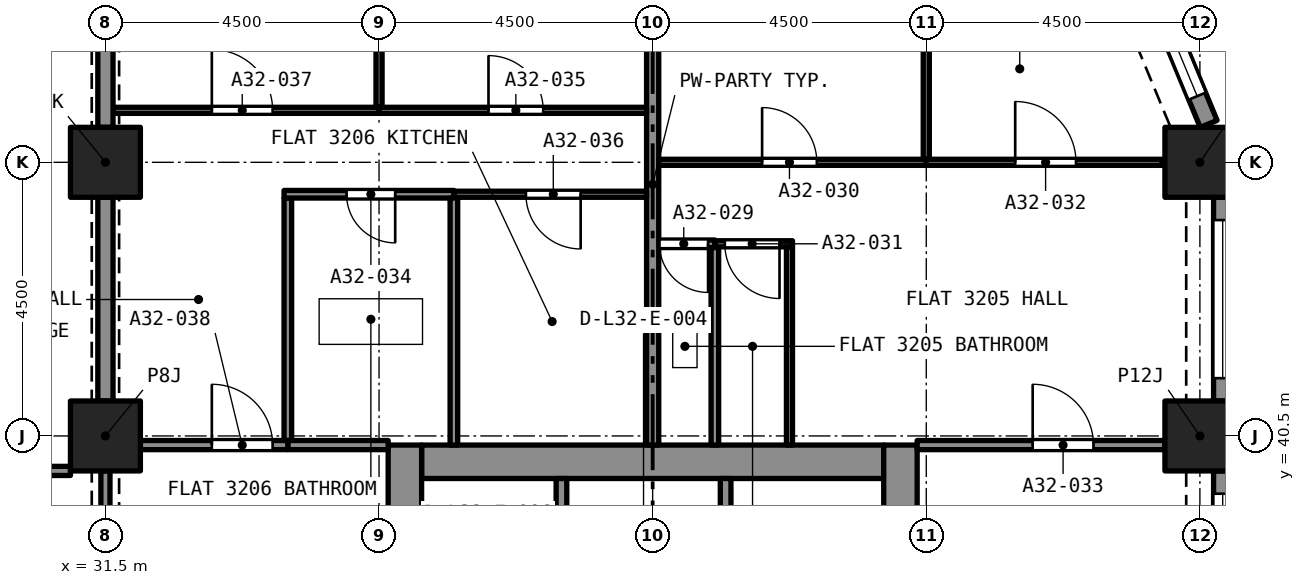
"""IFC4 building model, lengths in metres.
Left out: names, types, materials, properties, quantities, classifications, styles, units other than length and angle.
Written with IfcOpenShell. Run it as: python <this file> out.ifc"""

import sys

from ifc_helpers import new_model, si_unit, direction, frame, frame_2d, origin, origin_2d, place, context, subcontext, project, spatial, rectangle, extrude, element, fill, save


model = new_model("IFC4")
c1 = context("Model", 3, precision=1e-05, world=origin(), true_north=direction((0.0, 1.0)))
c2 = subcontext(c1, "Body", "Model", "MODEL_VIEW")
j1 = project(units=[si_unit("LENGTHUNIT", "METRE"), si_unit("PLANEANGLEUNIT", "RADIAN")], contexts=[c1])
p1 = place(None, origin())
s1 = spatial("IfcSite", under=j1, at=p1, CompositionType="ELEMENT")
p2 = place(p1, origin())
s2 = spatial("IfcBuilding", under=s1, at=p2, CompositionType="ELEMENT")
p3 = place(p2, frame((0.0, 0.0, 115.2)))
s3 = spatial("IfcBuildingStorey", under=s2, at=p3, CompositionType="ELEMENT", Elevation=115.2)
for number, where, z_axis, x_axis in (
    (1, (31.5, 40.5, 0.0), (0.0, 0.0, 1.0), (1.0, 0.0, 0.0)),
    (2, (49.5, 40.5, 0.0), (0.0, 0.0, 1.0), (1.0, 0.0, 0.0)),
    (3, (31.5, 45.0, 0.0), (0.0, 0.0, 1.0), (1.0, 0.0, 0.0)),
    (4, (49.5, 45.0, 0.0), (0.0, 0.0, 1.0), (1.0, 0.0, 0.0)),
):
    element("IfcColumn", number, at=place(p3, frame(where, z_axis=z_axis, x_axis=x_axis)), inside=s3, PredefinedType="COLUMN", context=c2, shape_type="SweptSolid", body=[
        extrude(rectangle(XDim=1.15, YDim=1.15, at=origin_2d()), origin(), (0.0, 0.0, 1.0), 3.2),
    ])
p4 = place(p3, frame((36.7, 40.075, 0.0), z_axis=(0.0, 0.0, 1.0), x_axis=(1.0, 0.0, 0.0)))
e5 = element("IfcWall", 5, at=p4, inside=s3, PredefinedType="SOLIDWALL", context=c2, shape_type="SweptSolid", body=[
    extrude(rectangle(XDim=7.6, YDim=0.55, at=frame_2d((3.8, 0.0))), origin(), (0.0, 0.0, 1.0), 3.2),
])
p5 = place(p3, frame((36.425, 27.15, 0.0), z_axis=(0.0, 0.0, 1.0), x_axis=(0.0, 1.0, 0.0)))
e6 = element("IfcWall", 6, at=p5, inside=s3, PredefinedType="SOLIDWALL", context=c2, shape_type="SweptSolid", body=[
    extrude(rectangle(XDim=13.2, YDim=0.55, at=frame_2d((6.6, 0.0))), origin(), (0.0, 0.0, 1.0), 3.2),
])
p6 = place(p5, frame((8.8, 0.0, 0.0)))
e7 = element("IfcOpeningElement", 7, at=p6, cuts=e6, PredefinedType="OPENING", context=c2, shape_type="SweptSolid", body=[
    extrude(rectangle(XDim=1.2, YDim=2.1, at=frame_2d((0.6, 1.05))), frame((0.0, 0.285, 0.0), z_axis=(0.0, -1.0, 0.0), x_axis=(1.0, 0.0, 0.0)), (0.0, 0.0, 1.0), 0.57),
])
p7 = place(p3, frame((44.575, 27.15, 0.0), z_axis=(0.0, 0.0, 1.0), x_axis=(0.0, 1.0, 0.0)))
e8 = element("IfcWall", 8, at=p7, inside=s3, PredefinedType="SOLIDWALL", context=c2, shape_type="SweptSolid", body=[
    extrude(rectangle(XDim=13.2, YDim=0.55, at=frame_2d((6.6, 0.0))), origin(), (0.0, 0.0, 1.0), 3.2),
])
p8 = place(p7, frame((8.8, 0.0, 0.0)))
e9 = element("IfcOpeningElement", 9, at=p8, cuts=e8, PredefinedType="OPENING", context=c2, shape_type="SweptSolid", body=[
    extrude(rectangle(XDim=1.2, YDim=2.1, at=frame_2d((0.6, 1.05))), frame((0.0, 0.285, 0.0), z_axis=(0.0, -1.0, 0.0), x_axis=(1.0, 0.0, 0.0)), (0.0, 0.0, 1.0), 0.57),
])
p9 = place(p3, frame((49.875, 39.925, 0.0), z_axis=(0.0, 0.0, 1.0), x_axis=(0.0, -1.0, 0.0)))
e10 = element("IfcWall", 10, at=p9, inside=s3, PredefinedType="SOLIDWALL", context=c2, shape_type="SweptSolid", body=[
    extrude(rectangle(XDim=3.35, YDim=0.3, at=frame_2d((1.675, 0.0))), origin(), (0.0, 0.0, 1.0), 3.2),
])
p10 = place(p9, frame((0.375, 0.0, 0.45)))
e11 = element("IfcOpeningElement", 11, at=p10, cuts=e10, PredefinedType="OPENING", context=c2, shape_type="SweptSolid", body=[
    extrude(rectangle(XDim=2.6, YDim=1.95, at=frame_2d((1.3, 0.975))), frame((0.0, 0.16, 0.0), z_axis=(0.0, -1.0, 0.0), x_axis=(1.0, 0.0, 0.0)), (0.0, 0.0, 1.0), 0.32),
])
p11 = place(p3, frame((49.875, 44.425, 0.0), z_axis=(0.0, 0.0, 1.0), x_axis=(0.0, -1.0, 0.0)))
e12 = element("IfcWall", 12, at=p11, inside=s3, PredefinedType="SOLIDWALL", context=c2, shape_type="SweptSolid", body=[
    extrude(rectangle(XDim=3.35, YDim=0.3, at=frame_2d((1.675, 0.0))), origin(), (0.0, 0.0, 1.0), 3.2),
])
p12 = place(p11, frame((0.375, 0.0, 0.45)))
e13 = element("IfcOpeningElement", 13, at=p12, cuts=e12, PredefinedType="OPENING", context=c2, shape_type="SweptSolid", body=[
    extrude(rectangle(XDim=2.6, YDim=1.95, at=frame_2d((1.3, 0.975))), frame((0.0, 0.16, 0.0), z_axis=(0.0, -1.0, 0.0), x_axis=(1.0, 0.0, 0.0)), (0.0, 0.0, 1.0), 0.32),
])
p13 = place(p3, frame((48.816, 47.631, 0.0), z_axis=(0.0, 0.0, 1.0), x_axis=(0.382723818695, -0.923862802911, 0.0)))
e14 = element("IfcWall", 14, at=p13, inside=s3, PredefinedType="SOLIDWALL", context=c2, shape_type="SweptSolid", body=[
    extrude(rectangle(XDim=2.164, YDim=0.3, at=frame_2d((1.082, 0.0))), origin(), (0.0, 0.0, 1.0), 3.2),
])
p14 = place(p13, frame((0.271, 0.0, 0.45)))
e15 = element("IfcOpeningElement", 15, at=p14, cuts=e14, PredefinedType="OPENING", context=c2, shape_type="SweptSolid", body=[
    extrude(rectangle(XDim=1.4, YDim=1.95, at=frame_2d((0.7, 0.975))), frame((0.0, 0.16, 0.0), z_axis=(0.0, -1.0, 0.0), x_axis=(1.0, 0.0, 0.0)), (0.0, 0.0, 1.0), 0.32),
])
p15 = place(p3, frame((41.523, 43.66, 0.0), z_axis=(0.0, 0.0, 1.0), x_axis=(-1.0, 0.0, 0.0)))
e16 = element("IfcWall", 16, at=p15, inside=s3, PredefinedType="PARTITIONING", context=c2, shape_type="SweptSolid", body=[
    extrude(rectangle(XDim=0.923, YDim=0.125, at=frame_2d((0.461, 0.0))), origin(), (0.0, 0.0, 1.0), 2.9),
])
p16 = place(p15, frame((0.111, 0.0, 0.0)))
e17 = element("IfcOpeningElement", 17, at=p16, cuts=e16, PredefinedType="OPENING", context=c2, shape_type="SweptSolid", body=[
    extrude(rectangle(XDim=0.8, YDim=2.1, at=frame_2d((0.4, 1.05))), frame((0.0, 0.073, 0.0), z_axis=(0.0, -1.0, 0.0), x_axis=(1.0, 0.0, 0.0)), (0.0, 0.0, 1.0), 0.145),
])
p17 = place(p3, frame((41.523, 40.35, 0.0), z_axis=(0.0, 0.0, 1.0), x_axis=(0.0, 1.0, 0.0)))
e18 = element("IfcWall", 18, at=p17, inside=s3, PredefinedType="PARTITIONING", context=c2, shape_type="SweptSolid", body=[
    extrude(rectangle(XDim=3.247, YDim=0.125, at=frame_2d((1.624, 0.0))), origin(), (0.0, 0.0, 1.0), 2.9),
])
p18 = place(p3, frame((40.5, 40.35, 0.0), z_axis=(0.0, 0.0, 1.0), x_axis=(0.0, 1.0, 0.0)))
e19 = element("IfcWall", 19, at=p18, inside=s3, PredefinedType="PARTITIONING", context=c2, shape_type="SweptSolid", body=[
    extrude(rectangle(XDim=8.575, YDim=0.2, at=frame_2d((4.288, 0.0))), origin(), (0.0, 0.0, 1.0), 2.9),
])
p19 = place(p3, frame((40.6, 45.0, 0.0), z_axis=(0.0, 0.0, 1.0), x_axis=(1.0, 0.0, 0.0)))
e20 = element("IfcWall", 20, at=p19, inside=s3, PredefinedType="PARTITIONING", context=c2, shape_type="SweptSolid", body=[
    extrude(rectangle(XDim=4.4, YDim=0.1, at=frame_2d((2.2, 0.0))), origin(), (0.0, 0.0, 1.0), 2.9),
])
p20 = place(p19, frame((1.7, 0.0, 0.0)))
e21 = element("IfcOpeningElement", 21, at=p20, cuts=e20, PredefinedType="OPENING", context=c2, shape_type="SweptSolid", body=[
    extrude(rectangle(XDim=0.9, YDim=2.1, at=frame_2d((0.45, 1.05))), frame((0.0, 0.06, 0.0), z_axis=(0.0, -1.0, 0.0), x_axis=(1.0, 0.0, 0.0)), (0.0, 0.0, 1.0), 0.12),
])
p21 = place(p3, frame((45.0, 45.05, 0.0), z_axis=(0.0, 0.0, 1.0), x_axis=(0.0, 1.0, 0.0)))
e22 = element("IfcWall", 22, at=p21, inside=s3, PredefinedType="PARTITIONING", context=c2, shape_type="SweptSolid", body=[
    extrude(rectangle(XDim=3.828, YDim=0.1, at=frame_2d((1.914, 0.0))), origin(), (0.0, 0.0, 1.0), 2.9),
])
p22 = place(p3, frame((42.75, 40.35, 0.0), z_axis=(0.0, 0.0, 1.0), x_axis=(0.0, 1.0, 0.0)))
e23 = element("IfcWall", 23, at=p22, inside=s3, PredefinedType="PARTITIONING", context=c2, shape_type="SweptSolid", body=[
    extrude(rectangle(XDim=3.26, YDim=0.1, at=frame_2d((1.63, 0.0))), origin(), (0.0, 0.0, 1.0), 2.9),
])
p23 = place(p3, frame((42.8, 43.66, 0.0), z_axis=(0.0, 0.0, 1.0), x_axis=(-1.0, 0.0, 0.0)))
e24 = element("IfcWall", 24, at=p23, inside=s3, PredefinedType="PARTITIONING", context=c2, shape_type="SweptSolid", body=[
    extrude(rectangle(XDim=1.277, YDim=0.1, at=frame_2d((0.639, 0.0))), origin(), (0.0, 0.0, 1.0), 2.9),
])
p24 = place(p23, frame((0.214, 0.0, 0.0)))
e25 = element("IfcOpeningElement", 25, at=p24, cuts=e24, PredefinedType="OPENING", context=c2, shape_type="SweptSolid", body=[
    extrude(rectangle(XDim=0.9, YDim=2.1, at=frame_2d((0.45, 1.05))), frame((0.0, 0.06, 0.0), z_axis=(0.0, -1.0, 0.0), x_axis=(1.0, 0.0, 0.0)), (0.0, 0.0, 1.0), 0.12),
])
p25 = place(p3, frame((45.0, 45.0, 0.0), z_axis=(0.0, 0.0, 1.0), x_axis=(1.0, 0.0, 0.0)))
e26 = element("IfcWall", 26, at=p25, inside=s3, PredefinedType="PARTITIONING", context=c2, shape_type="SweptSolid", body=[
    extrude(rectangle(XDim=3.878, YDim=0.1, at=frame_2d((1.939, 0.0))), origin(), (0.0, 0.0, 1.0), 2.9),
])
p26 = place(p25, frame((1.462, 0.0, 0.0)))
e27 = element("IfcOpeningElement", 27, at=p26, cuts=e26, PredefinedType="OPENING", context=c2, shape_type="SweptSolid", body=[
    extrude(rectangle(XDim=1.0, YDim=2.1, at=frame_2d((0.5, 1.05))), frame((0.0, 0.06, 0.0), z_axis=(0.0, -1.0, 0.0), x_axis=(1.0, 0.0, 0.0)), (0.0, 0.0, 1.0), 0.12),
])
p27 = place(p3, frame((44.85, 40.35, 0.0), z_axis=(0.0, 0.0, 1.0), x_axis=(1.0, 0.0, 0.0)))
e28 = element("IfcWall", 28, at=p27, inside=s3, PredefinedType="PARTITIONING", context=c2, shape_type="SweptSolid", body=[
    extrude(rectangle(XDim=4.075, YDim=0.15, at=frame_2d((2.038, 0.0))), origin(), (0.0, 0.0, 1.0), 2.9),
])
p28 = place(p27, frame((1.9, 0.0, 0.0)))
e29 = element("IfcOpeningElement", 29, at=p28, cuts=e28, PredefinedType="OPENING", context=c2, shape_type="SweptSolid", body=[
    extrude(rectangle(XDim=1.0, YDim=2.1, at=frame_2d((0.5, 1.05))), frame((0.0, 0.085, 0.0), z_axis=(0.0, -1.0, 0.0), x_axis=(1.0, 0.0, 0.0)), (0.0, 0.0, 1.0), 0.17),
])
p29 = place(p3, frame((34.5, 40.425, 0.0), z_axis=(0.0, 0.0, 1.0), x_axis=(0.0, 1.0, 0.0)))
e30 = element("IfcWall", 30, at=p29, inside=s3, PredefinedType="PARTITIONING", context=c2, shape_type="SweptSolid", body=[
    extrude(rectangle(XDim=3.988, YDim=0.125, at=frame_2d((1.994, 0.0))), origin(), (0.0, 0.0, 1.0), 2.9),
])
p30 = place(p3, frame((37.231, 44.475, 0.0), z_axis=(0.0, 0.0, 1.0), x_axis=(-1.0, 0.0, 0.0)))
e31 = element("IfcWall", 31, at=p30, inside=s3, PredefinedType="PARTITIONING", context=c2, shape_type="SweptSolid", body=[
    extrude(rectangle(XDim=2.794, YDim=0.125, at=frame_2d((1.397, 0.0))), origin(), (0.0, 0.0, 1.0), 2.9),
])
p31 = place(p30, frame((0.966, 0.0, 0.0)))
e32 = element("IfcOpeningElement", 32, at=p31, cuts=e31, PredefinedType="OPENING", context=c2, shape_type="SweptSolid", body=[
    extrude(rectangle(XDim=0.8, YDim=2.1, at=frame_2d((0.4, 1.05))), frame((0.0, 0.073, 0.0), z_axis=(0.0, -1.0, 0.0), x_axis=(1.0, 0.0, 0.0)), (0.0, 0.0, 1.0), 0.145),
])
p32 = place(p3, frame((37.231, 40.35, 0.0), z_axis=(0.0, 0.0, 1.0), x_axis=(0.0, 1.0, 0.0)))
e33 = element("IfcWall", 33, at=p32, inside=s3, PredefinedType="PARTITIONING", context=c2, shape_type="SweptSolid", body=[
    extrude(rectangle(XDim=4.062, YDim=0.125, at=frame_2d((2.031, 0.0))), origin(), (0.0, 0.0, 1.0), 2.9),
])
p33 = place(p3, frame((34.5, 40.35, 0.0), z_axis=(0.0, 0.0, 1.0), x_axis=(1.0, 0.0, 0.0)))
e34 = element("IfcWall", 34, at=p33, inside=s3, PredefinedType="PARTITIONING", context=c2, shape_type="SweptSolid", body=[
    extrude(rectangle(XDim=1.65, YDim=0.15, at=frame_2d((0.825, 0.0))), origin(), (0.0, 0.0, 1.0), 2.9),
])
p34 = place(p3, frame((36.0, 45.855, 0.0), z_axis=(0.0, 0.0, 1.0), x_axis=(1.0, 0.0, 0.0)))
e35 = element("IfcWall", 35, at=p34, inside=s3, PredefinedType="PARTITIONING", context=c2, shape_type="SweptSolid", body=[
    extrude(rectangle(XDim=4.4, YDim=0.1, at=frame_2d((2.2, 0.0))), origin(), (0.0, 0.0, 1.0), 2.9),
])
p35 = place(p34, frame((1.8, 0.0, 0.0)))
e36 = element("IfcOpeningElement", 36, at=p35, cuts=e35, PredefinedType="OPENING", context=c2, shape_type="SweptSolid", body=[
    extrude(rectangle(XDim=0.9, YDim=2.1, at=frame_2d((0.45, 1.05))), frame((0.0, 0.06, 0.0), z_axis=(0.0, -1.0, 0.0), x_axis=(1.0, 0.0, 0.0)), (0.0, 0.0, 1.0), 0.12),
])
p36 = place(p3, frame((36.0, 45.905, 0.0), z_axis=(0.0, 0.0, 1.0), x_axis=(0.0, 1.0, 0.0)))
e37 = element("IfcWall", 37, at=p36, inside=s3, PredefinedType="PARTITIONING", context=c2, shape_type="SweptSolid", body=[
    extrude(rectangle(XDim=3.02, YDim=0.1, at=frame_2d((1.51, 0.0))), origin(), (0.0, 0.0, 1.0), 2.9),
])
p37 = place(p3, frame((40.4, 44.475, 0.0), z_axis=(0.0, 0.0, 1.0), x_axis=(-1.0, 0.0, 0.0)))
e38 = element("IfcWall", 38, at=p37, inside=s3, PredefinedType="PARTITIONING", context=c2, shape_type="SweptSolid", body=[
    extrude(rectangle(XDim=3.168, YDim=0.1, at=frame_2d((1.584, 0.0))), origin(), (0.0, 0.0, 1.0), 2.9),
])
p38 = place(p37, frame((1.084, 0.0, 0.0)))
e39 = element("IfcOpeningElement", 39, at=p38, cuts=e38, PredefinedType="OPENING", context=c2, shape_type="SweptSolid", body=[
    extrude(rectangle(XDim=0.9, YDim=2.1, at=frame_2d((0.45, 1.05))), frame((0.0, 0.06, 0.0), z_axis=(0.0, -1.0, 0.0), x_axis=(1.0, 0.0, 0.0)), (0.0, 0.0, 1.0), 0.12),
])
p39 = place(p3, frame((31.625, 45.855, 0.0), z_axis=(0.0, 0.0, 1.0), x_axis=(1.0, 0.0, 0.0)))
e40 = element("IfcWall", 40, at=p39, inside=s3, PredefinedType="PARTITIONING", context=c2, shape_type="SweptSolid", body=[
    extrude(rectangle(XDim=4.375, YDim=0.1, at=frame_2d((2.188, 0.0))), origin(), (0.0, 0.0, 1.0), 2.9),
])
p40 = place(p39, frame((1.625, 0.0, 0.0)))
e41 = element("IfcOpeningElement", 41, at=p40, cuts=e40, PredefinedType="OPENING", context=c2, shape_type="SweptSolid", body=[
    extrude(rectangle(XDim=1.0, YDim=2.1, at=frame_2d((0.5, 1.05))), frame((0.0, 0.06, 0.0), z_axis=(0.0, -1.0, 0.0), x_axis=(1.0, 0.0, 0.0)), (0.0, 0.0, 1.0), 0.12),
])
for number, where, z_axis, x_axis in (
    (42, (31.5, 41.075, 0.0), (0.0, 0.0, 1.0), (0.0, 1.0, 0.0)),
    (43, (31.5, 45.575, 0.0), (0.0, 0.0, 1.0), (0.0, 1.0, 0.0)),
):
    element("IfcWall", number, at=place(p3, frame(where, z_axis=z_axis, x_axis=x_axis)), inside=s3, PredefinedType="PARTITIONING", context=c2, shape_type="SweptSolid", body=[
        extrude(rectangle(XDim=3.35, YDim=0.25, at=frame_2d((1.675, 0.0))), origin(), (0.0, 0.0, 1.0), 2.38),
    ])
p41 = place(p3, frame((32.075, 40.35, 0.0), z_axis=(0.0, 0.0, 1.0), x_axis=(1.0, 0.0, 0.0)))
e44 = element("IfcWall", 44, at=p41, inside=s3, PredefinedType="PARTITIONING", context=c2, shape_type="SweptSolid", body=[
    extrude(rectangle(XDim=2.425, YDim=0.15, at=frame_2d((1.212, 0.0))), origin(), (0.0, 0.0, 1.0), 2.9),
])
p42 = place(p41, frame((1.175, 0.0, 0.0)))
e45 = element("IfcOpeningElement", 45, at=p42, cuts=e44, PredefinedType="OPENING", context=c2, shape_type="SweptSolid", body=[
    extrude(rectangle(XDim=1.0, YDim=2.1, at=frame_2d((0.5, 1.05))), frame((0.0, 0.085, 0.0), z_axis=(0.0, -1.0, 0.0), x_axis=(1.0, 0.0, 0.0)), (0.0, 0.0, 1.0), 0.17),
])
p43 = place(p3, frame((27.0, 39.925, 0.0), z_axis=(0.0, 0.0, 1.0), x_axis=(1.0, 0.0, 0.0)))
e46 = element("IfcWall", 46, at=p43, inside=s3, PredefinedType="PARTITIONING", context=c2, shape_type="SweptSolid", body=[
    extrude(rectangle(XDim=3.925, YDim=0.15, at=frame_2d((1.962, 0.0))), origin(), (0.0, 0.0, 1.0), 2.75),
])
p44 = place(p43, frame((1.75, 0.0, 0.0)))
e47 = element("IfcOpeningElement", 47, at=p44, cuts=e46, PredefinedType="OPENING", context=c2, shape_type="SweptSolid", body=[
    extrude(rectangle(XDim=1.0, YDim=2.1, at=frame_2d((0.5, 1.05))), frame((0.0, 0.085, 0.0), z_axis=(0.0, -1.0, 0.0), x_axis=(1.0, 0.0, 0.0)), (0.0, 0.0, 1.0), 0.17),
])
p45 = place(p3, frame((31.5, 36.575, 0.0), z_axis=(0.0, 0.0, 1.0), x_axis=(0.0, 1.0, 0.0)))
e48 = element("IfcWall", 48, at=p45, inside=s3, PredefinedType="PARTITIONING", context=c2, shape_type="SweptSolid", body=[
    extrude(rectangle(XDim=3.35, YDim=0.15, at=frame_2d((1.675, 0.0))), origin(), (0.0, 0.0, 1.0), 2.38),
])
p46 = place(p45, frame((1.075, 0.0, 0.0)))
e49 = element("IfcOpeningElement", 49, at=p46, cuts=e48, PredefinedType="OPENING", context=c2, shape_type="SweptSolid", body=[
    extrude(rectangle(XDim=1.2, YDim=2.1, at=frame_2d((0.6, 1.05))), frame((0.0, 0.085, 0.0), z_axis=(0.0, -1.0, 0.0), x_axis=(1.0, 0.0, 0.0)), (0.0, 0.0, 1.0), 0.17),
])
for number, where, z_axis, x_axis in (
    (50, (41.7, 37.5, 0.0), (0.0, 0.0, 1.0), (0.0, 1.0, 0.0)),
    (51, (39.0, 37.5, 0.0), (0.0, 0.0, 1.0), (0.0, 1.0, 0.0)),
):
    element("IfcWall", number, at=place(p3, frame(where, z_axis=z_axis, x_axis=x_axis)), inside=s3, PredefinedType="SOLIDWALL", context=c2, shape_type="SweptSolid", body=[
        extrude(rectangle(XDim=2.3, YDim=0.175, at=frame_2d((1.15, 0.0))), origin(), (0.0, 0.0, 1.0), 2.9),
    ])
p47 = place(p10, origin())
e52 = element("IfcWindow", 52, at=p47, inside=s3, PartitioningType="SINGLE_PANEL", PredefinedType="WINDOW", context=c2, shape_type="SweptSolid", body=[
    extrude(rectangle(XDim=2.6, YDim=1.95, at=frame_2d((1.3, 0.975))), frame((0.0, 0.03, 0.0), z_axis=(0.0, -1.0, 0.0), x_axis=(1.0, 0.0, 0.0)), (0.0, 0.0, 1.0), 0.06),
])
fill(e11, e52)
p48 = place(p12, origin())
e53 = element("IfcWindow", 53, at=p48, inside=s3, PartitioningType="SINGLE_PANEL", PredefinedType="WINDOW", context=c2, shape_type="SweptSolid", body=[
    extrude(rectangle(XDim=2.6, YDim=1.95, at=frame_2d((1.3, 0.975))), frame((0.0, 0.03, 0.0), z_axis=(0.0, -1.0, 0.0), x_axis=(1.0, 0.0, 0.0)), (0.0, 0.0, 1.0), 0.06),
])
fill(e13, e53)
p49 = place(p14, origin())
e54 = element("IfcWindow", 54, at=p49, inside=s3, PartitioningType="SINGLE_PANEL", PredefinedType="WINDOW", context=c2, shape_type="SweptSolid", body=[
    extrude(rectangle(XDim=1.4, YDim=1.95, at=frame_2d((0.7, 0.975))), frame((0.0, 0.03, 0.0), z_axis=(0.0, -1.0, 0.0), x_axis=(1.0, 0.0, 0.0)), (0.0, 0.0, 1.0), 0.06),
])
fill(e15, e54)
p50 = place(p16, origin())
e55 = element("IfcDoor", 55, at=p50, inside=s3, OperationType="SINGLE_SWING_RIGHT", PredefinedType="DOOR", context=c2, shape_type="SweptSolid", body=[
    extrude(rectangle(XDim=0.8, YDim=2.1, at=frame_2d((0.4, 1.05))), frame((0.0, 0.025, 0.0), z_axis=(0.0, -1.0, 0.0), x_axis=(1.0, 0.0, 0.0)), (0.0, 0.0, 1.0), 0.05),
])
fill(e17, e55)
p51 = place(p20, origin())
e56 = element("IfcDoor", 56, at=p51, inside=s3, OperationType="SINGLE_SWING_LEFT", PredefinedType="DOOR", context=c2, shape_type="SweptSolid", body=[
    extrude(rectangle(XDim=0.9, YDim=2.1, at=frame_2d((0.45, 1.05))), frame((0.0, 0.025, 0.0), z_axis=(0.0, -1.0, 0.0), x_axis=(1.0, 0.0, 0.0)), (0.0, 0.0, 1.0), 0.05),
])
fill(e21, e56)
p52 = place(p24, origin())
e57 = element("IfcDoor", 57, at=p52, inside=s3, OperationType="SINGLE_SWING_RIGHT", PredefinedType="DOOR", context=c2, shape_type="SweptSolid", body=[
    extrude(rectangle(XDim=0.9, YDim=2.1, at=frame_2d((0.45, 1.05))), frame((0.0, 0.025, 0.0), z_axis=(0.0, -1.0, 0.0), x_axis=(1.0, 0.0, 0.0)), (0.0, 0.0, 1.0), 0.05),
])
fill(e25, e57)
p53 = place(p26, origin())
e58 = element("IfcDoor", 58, at=p53, inside=s3, OperationType="SINGLE_SWING_RIGHT", PredefinedType="DOOR", context=c2, shape_type="SweptSolid", body=[
    extrude(rectangle(XDim=1.0, YDim=2.1, at=frame_2d((0.5, 1.05))), frame((0.0, 0.025, 0.0), z_axis=(0.0, -1.0, 0.0), x_axis=(1.0, 0.0, 0.0)), (0.0, 0.0, 1.0), 0.05),
])
fill(e27, e58)
p54 = place(p28, origin())
e59 = element("IfcDoor", 59, at=p54, inside=s3, OperationType="SINGLE_SWING_RIGHT", PredefinedType="DOOR", context=c2, shape_type="SweptSolid", body=[
    extrude(rectangle(XDim=1.0, YDim=2.1, at=frame_2d((0.5, 1.05))), frame((0.0, 0.025, 0.0), z_axis=(0.0, -1.0, 0.0), x_axis=(1.0, 0.0, 0.0)), (0.0, 0.0, 1.0), 0.05),
])
fill(e29, e59)
p55 = place(p31, origin())
e60 = element("IfcDoor", 60, at=p55, inside=s3, OperationType="SINGLE_SWING_LEFT", PredefinedType="DOOR", context=c2, shape_type="SweptSolid", body=[
    extrude(rectangle(XDim=0.8, YDim=2.1, at=frame_2d((0.4, 1.05))), frame((0.0, 0.025, 0.0), z_axis=(0.0, -1.0, 0.0), x_axis=(1.0, 0.0, 0.0)), (0.0, 0.0, 1.0), 0.05),
])
fill(e32, e60)
p56 = place(p35, origin())
e61 = element("IfcDoor", 61, at=p56, inside=s3, OperationType="SINGLE_SWING_RIGHT", PredefinedType="DOOR", context=c2, shape_type="SweptSolid", body=[
    extrude(rectangle(XDim=0.9, YDim=2.1, at=frame_2d((0.45, 1.05))), frame((0.0, 0.025, 0.0), z_axis=(0.0, -1.0, 0.0), x_axis=(1.0, 0.0, 0.0)), (0.0, 0.0, 1.0), 0.05),
])
fill(e36, e61)
p57 = place(p38, origin())
e62 = element("IfcDoor", 62, at=p57, inside=s3, OperationType="SINGLE_SWING_LEFT", PredefinedType="DOOR", context=c2, shape_type="SweptSolid", body=[
    extrude(rectangle(XDim=0.9, YDim=2.1, at=frame_2d((0.45, 1.05))), frame((0.0, 0.025, 0.0), z_axis=(0.0, -1.0, 0.0), x_axis=(1.0, 0.0, 0.0)), (0.0, 0.0, 1.0), 0.05),
])
fill(e39, e62)
p58 = place(p40, origin())
e63 = element("IfcDoor", 63, at=p58, inside=s3, OperationType="SINGLE_SWING_LEFT", PredefinedType="DOOR", context=c2, shape_type="SweptSolid", body=[
    extrude(rectangle(XDim=1.0, YDim=2.1, at=frame_2d((0.5, 1.05))), frame((0.0, 0.025, 0.0), z_axis=(0.0, -1.0, 0.0), x_axis=(1.0, 0.0, 0.0)), (0.0, 0.0, 1.0), 0.05),
])
fill(e41, e63)
p59 = place(p42, origin())
e64 = element("IfcDoor", 64, at=p59, inside=s3, OperationType="SINGLE_SWING_RIGHT", PredefinedType="DOOR", context=c2, shape_type="SweptSolid", body=[
    extrude(rectangle(XDim=1.0, YDim=2.1, at=frame_2d((0.5, 1.05))), frame((0.0, 0.025, 0.0), z_axis=(0.0, -1.0, 0.0), x_axis=(1.0, 0.0, 0.0)), (0.0, 0.0, 1.0), 0.05),
])
fill(e45, e64)
save(model, sys.argv[1])
